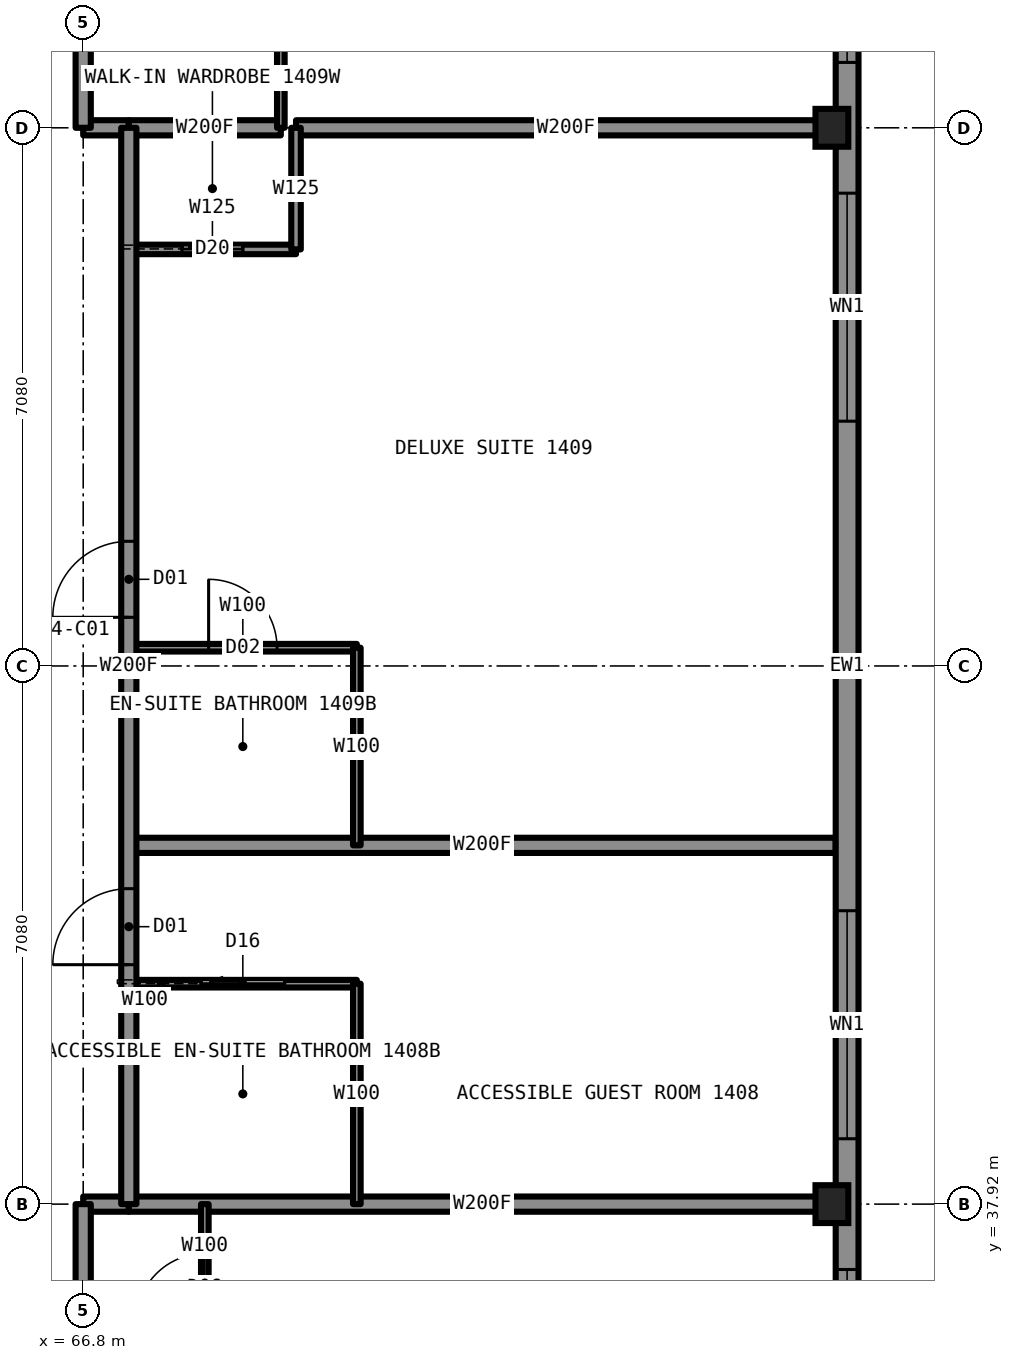
"""IFC4 building model, lengths in metres.
Left out: names, types, materials, properties, quantities, classifications, styles, units other than length and angle.
Written with IfcOpenShell. Run it as: python <this file> out.ifc"""

import sys

from ifc_helpers import new_model, si_unit, direction, frame, frame_2d, origin, origin_2d, place, context, subcontext, project, spatial, rectangle, i_section, extrude, element, fill, save


model = new_model("IFC4")
c1 = context("Model", 3, precision=1e-05, world=origin(), true_north=direction((0.0, 1.0)))
c2 = subcontext(c1, "Body", "Model", "MODEL_VIEW")
j1 = project(units=[si_unit("LENGTHUNIT", "METRE"), si_unit("PLANEANGLEUNIT", "RADIAN")], contexts=[c1])
p1 = place(None, origin())
s1 = spatial("IfcSite", under=j1, at=p1, CompositionType="ELEMENT")
p2 = place(p1, origin())
s2 = spatial("IfcBuilding", under=s1, at=p2, CompositionType="ELEMENT")
p3 = place(p2, frame((0.0, 0.0, 49.5)))
s3 = spatial("IfcBuildingStorey", under=s2, at=p3, CompositionType="ELEMENT", Elevation=49.5)
for number, where, z_axis, x_axis in (
    (1, (76.65, 37.92, 0.0), (0.0, 0.0, 1.0), (1.0, 0.0, 0.0)),
    (2, (76.65, 52.08, 0.0), (0.0, 0.0, 1.0), (1.0, 0.0, 0.0)),
):
    element("IfcColumn", number, at=place(p3, frame(where, z_axis=z_axis, x_axis=x_axis)), inside=s3, PredefinedType="COLUMN", context=c2, shape_type="SweptSolid", body=[
        extrude(i_section(OverallWidth=0.432, OverallDepth=0.498, WebThickness=0.056, FlangeThickness=0.089, at=origin_2d()), origin(), (0.0, 0.0, 1.0), 3.5),
    ])
p4 = place(p3, frame((67.4, 42.64, 0.0), z_axis=(0.0, 0.0, 1.0), x_axis=(1.0, 0.0, 0.0)))
e3 = element("IfcWall", 3, at=p4, inside=s3, PredefinedType="PARTITIONING", context=c2, shape_type="SweptSolid", body=[
    extrude(rectangle(XDim=9.3, YDim=0.2, at=frame_2d((4.65, 0.0))), origin(), (0.0, 0.0, 1.0), 2.723),
])
p5 = place(p3, frame((67.4, 40.82, 0.0), z_axis=(0.0, 0.0, 1.0), x_axis=(1.0, 0.0, 0.0)))
e4 = element("IfcWall", 4, at=p5, inside=s3, PredefinedType="PARTITIONING", context=c2, shape_type="SweptSolid", body=[
    extrude(rectangle(XDim=3.0, YDim=0.1, at=frame_2d((1.5, 0.0))), origin(), (0.0, 0.0, 1.0), 3.33),
])
p6 = place(p5, frame((0.95, 0.0, 0.0)))
e5 = element("IfcOpeningElement", 5, at=p6, cuts=e4, PredefinedType="OPENING", context=c2, shape_type="SweptSolid", body=[
    extrude(rectangle(XDim=1.1, YDim=2.1, at=frame_2d((0.55, 1.05))), frame((0.0, 0.06, 0.0), z_axis=(0.0, -1.0, 0.0), x_axis=(1.0, 0.0, 0.0)), (0.0, 0.0, 1.0), 0.12),
])
p7 = place(p3, frame((66.8, 37.92, 0.0), z_axis=(0.0, 0.0, 1.0), x_axis=(1.0, 0.0, 0.0)))
e6 = element("IfcWall", 6, at=p7, inside=s3, PredefinedType="PARTITIONING", context=c2, shape_type="SweptSolid", body=[
    extrude(rectangle(XDim=0.6, YDim=0.2, at=frame_2d((0.3, 0.0))), origin(), (0.0, 0.0, 1.0), 2.573),
])
p8 = place(p3, frame((67.4, 37.92, 0.0), z_axis=(0.0, 0.0, 1.0), x_axis=(1.0, 0.0, 0.0)))
e7 = element("IfcWall", 7, at=p8, inside=s3, PredefinedType="PARTITIONING", context=c2, shape_type="SweptSolid", body=[
    extrude(rectangle(XDim=9.3, YDim=0.2, at=frame_2d((4.65, 0.0))), origin(), (0.0, 0.0, 1.0), 2.573),
])
p9 = place(p3, frame((67.4, 45.24, 0.0), z_axis=(0.0, 0.0, 1.0), x_axis=(1.0, 0.0, 0.0)))
e8 = element("IfcWall", 8, at=p9, inside=s3, PredefinedType="PARTITIONING", context=c2, shape_type="SweptSolid", body=[
    extrude(rectangle(XDim=3.0, YDim=0.1, at=frame_2d((1.5, 0.0))), origin(), (0.0, 0.0, 1.0), 3.33),
])
p10 = place(p9, frame((1.05, 0.0, 0.0)))
e9 = element("IfcOpeningElement", 9, at=p10, cuts=e8, PredefinedType="OPENING", context=c2, shape_type="SweptSolid", body=[
    extrude(rectangle(XDim=0.9, YDim=2.1, at=frame_2d((0.45, 1.05))), frame((0.0, 0.06, 0.0), z_axis=(0.0, -1.0, 0.0), x_axis=(1.0, 0.0, 0.0)), (0.0, 0.0, 1.0), 0.12),
])
p11 = place(p3, frame((67.4, 50.48, 0.0), z_axis=(0.0, 0.0, 1.0), x_axis=(1.0, 0.0, 0.0)))
e10 = element("IfcWall", 10, at=p11, inside=s3, PredefinedType="PARTITIONING", context=c2, shape_type="SweptSolid", body=[
    extrude(rectangle(XDim=2.2, YDim=0.125, at=frame_2d((1.1, 0.0))), origin(), (0.0, 0.0, 1.0), 3.33),
])
p12 = place(p11, frame((0.7, 0.0, 0.0)))
e11 = element("IfcOpeningElement", 11, at=p12, cuts=e10, PredefinedType="OPENING", context=c2, shape_type="SweptSolid", body=[
    extrude(rectangle(XDim=0.8, YDim=2.1, at=frame_2d((0.4, 1.05))), frame((0.0, 0.073, 0.0), z_axis=(0.0, -1.0, 0.0), x_axis=(1.0, 0.0, 0.0)), (0.0, 0.0, 1.0), 0.145),
])
p13 = place(p3, frame((66.8, 52.08, 0.0), z_axis=(0.0, 0.0, 1.0), x_axis=(1.0, 0.0, 0.0)))
e12 = element("IfcWall", 12, at=p13, inside=s3, PredefinedType="PARTITIONING", context=c2, shape_type="SweptSolid", body=[
    extrude(rectangle(XDim=0.6, YDim=0.2, at=frame_2d((0.3, 0.0))), origin(), (0.0, 0.0, 1.0), 2.573),
])
p14 = place(p3, frame((67.4, 52.08, 0.0), z_axis=(0.0, 0.0, 1.0), x_axis=(1.0, 0.0, 0.0)))
e13 = element("IfcWall", 13, at=p14, inside=s3, PredefinedType="PARTITIONING", context=c2, shape_type="SweptSolid", body=[
    extrude(rectangle(XDim=2.0, YDim=0.2, at=frame_2d((1.0, 0.0))), origin(), (0.0, 0.0, 1.0), 2.573),
])
p15 = place(p3, frame((69.6, 52.08, 0.0), z_axis=(0.0, 0.0, 1.0), x_axis=(1.0, 0.0, 0.0)))
e14 = element("IfcWall", 14, at=p15, inside=s3, PredefinedType="PARTITIONING", context=c2, shape_type="SweptSolid", body=[
    extrude(rectangle(XDim=7.1, YDim=0.2, at=frame_2d((3.55, 0.0))), origin(), (0.0, 0.0, 1.0), 2.573),
])
p16 = place(p3, frame((66.8, 33.2, 0.0), z_axis=(0.0, 0.0, 1.0), x_axis=(0.0, 1.0, 0.0)))
e15 = element("IfcWall", 15, at=p16, inside=s3, PredefinedType="PARTITIONING", context=c2, shape_type="SweptSolid", body=[
    extrude(rectangle(XDim=4.72, YDim=0.2, at=frame_2d((2.36, 0.0))), origin(), (0.0, 0.0, 1.0), 3.33),
])
p17 = place(p16, frame((0.65, 0.0, 0.0)))
e16 = element("IfcOpeningElement", 16, at=p17, cuts=e15, PredefinedType="OPENING", context=c2, shape_type="SweptSolid", body=[
    extrude(rectangle(XDim=1.1, YDim=2.2, at=frame_2d((0.55, 1.1))), frame((0.0, 0.11, 0.0), z_axis=(0.0, -1.0, 0.0), x_axis=(1.0, 0.0, 0.0)), (0.0, 0.0, 1.0), 0.22),
])
p18 = place(p3, frame((66.8, 52.08, 0.0), z_axis=(0.0, 0.0, 1.0), x_axis=(0.0, 1.0, 0.0)))
e17 = element("IfcWall", 17, at=p18, inside=s3, PredefinedType="PARTITIONING", context=c2, shape_type="SweptSolid", body=[
    extrude(rectangle(XDim=4.72, YDim=0.2, at=frame_2d((2.36, 0.0))), origin(), (0.0, 0.0, 1.0), 3.33),
])
p19 = place(p18, frame((2.96, 0.0, 0.0)))
e18 = element("IfcOpeningElement", 18, at=p19, cuts=e17, PredefinedType="OPENING", context=c2, shape_type="SweptSolid", body=[
    extrude(rectangle(XDim=1.1, YDim=2.2, at=frame_2d((0.55, 1.1))), frame((0.0, 0.11, 0.0), z_axis=(0.0, -1.0, 0.0), x_axis=(1.0, 0.0, 0.0)), (0.0, 0.0, 1.0), 0.22),
])
p20 = place(p3, frame((67.4, 37.92, 0.0), z_axis=(0.0, 0.0, 1.0), x_axis=(0.0, 1.0, 0.0)))
e19 = element("IfcWall", 19, at=p20, inside=s3, PredefinedType="PARTITIONING", context=c2, shape_type="SweptSolid", body=[
    extrude(rectangle(XDim=14.16, YDim=0.2, at=frame_2d((7.08, 0.0))), origin(), (0.0, 0.0, 1.0), 3.33),
])
p21 = place(p20, frame((3.15, 0.0, 0.0)))
e20 = element("IfcOpeningElement", 20, at=p21, cuts=e19, PredefinedType="OPENING", context=c2, shape_type="SweptSolid", body=[
    extrude(rectangle(XDim=1.0, YDim=2.2, at=frame_2d((0.5, 1.1))), frame((0.0, 0.11, 0.0), z_axis=(0.0, -1.0, 0.0), x_axis=(1.0, 0.0, 0.0)), (0.0, 0.0, 1.0), 0.22),
])
p22 = place(p20, frame((7.72, 0.0, 0.0)))
e21 = element("IfcOpeningElement", 21, at=p22, cuts=e19, PredefinedType="OPENING", context=c2, shape_type="SweptSolid", body=[
    extrude(rectangle(XDim=1.0, YDim=2.2, at=frame_2d((0.5, 1.1))), frame((0.0, 0.11, 0.0), z_axis=(0.0, -1.0, 0.0), x_axis=(1.0, 0.0, 0.0)), (0.0, 0.0, 1.0), 0.22),
])
p23 = place(p3, frame((68.4, 35.72, 0.0), z_axis=(0.0, 0.0, 1.0), x_axis=(0.0, 1.0, 0.0)))
e22 = element("IfcWall", 22, at=p23, inside=s3, PredefinedType="PARTITIONING", context=c2, shape_type="SweptSolid", body=[
    extrude(rectangle(XDim=2.2, YDim=0.1, at=frame_2d((1.1, 0.0))), origin(), (0.0, 0.0, 1.0), 3.33),
])
p24 = place(p23, frame((0.65, 0.0, 0.0)))
e23 = element("IfcOpeningElement", 23, at=p24, cuts=e22, PredefinedType="OPENING", context=c2, shape_type="SweptSolid", body=[
    extrude(rectangle(XDim=0.9, YDim=2.1, at=frame_2d((0.45, 1.05))), frame((0.0, 0.06, 0.0), z_axis=(0.0, -1.0, 0.0), x_axis=(1.0, 0.0, 0.0)), (0.0, 0.0, 1.0), 0.12),
])
p25 = place(p3, frame((69.4, 52.08, 0.0), z_axis=(0.0, 0.0, 1.0), x_axis=(0.0, 1.0, 0.0)))
e24 = element("IfcWall", 24, at=p25, inside=s3, PredefinedType="PARTITIONING", context=c2, shape_type="SweptSolid", body=[
    extrude(rectangle(XDim=2.6, YDim=0.1, at=frame_2d((1.3, 0.0))), origin(), (0.0, 0.0, 1.0), 3.33),
])
p26 = place(p3, frame((69.6, 50.48, 0.0), z_axis=(0.0, 0.0, 1.0), x_axis=(0.0, 1.0, 0.0)))
e25 = element("IfcWall", 25, at=p26, inside=s3, PredefinedType="PARTITIONING", context=c2, shape_type="SweptSolid", body=[
    extrude(rectangle(XDim=1.6, YDim=0.125, at=frame_2d((0.8, 0.0))), origin(), (0.0, 0.0, 1.0), 3.33),
])
p27 = place(p3, frame((70.4, 37.92, 0.0), z_axis=(0.0, 0.0, 1.0), x_axis=(0.0, 1.0, 0.0)))
e26 = element("IfcWall", 26, at=p27, inside=s3, PredefinedType="PARTITIONING", context=c2, shape_type="SweptSolid", body=[
    extrude(rectangle(XDim=2.9, YDim=0.1, at=frame_2d((1.45, 0.0))), origin(), (0.0, 0.0, 1.0), 3.33),
])
p28 = place(p3, frame((70.4, 42.64, 0.0), z_axis=(0.0, 0.0, 1.0), x_axis=(0.0, 1.0, 0.0)))
e27 = element("IfcWall", 27, at=p28, inside=s3, PredefinedType="PARTITIONING", context=c2, shape_type="SweptSolid", body=[
    extrude(rectangle(XDim=2.6, YDim=0.1, at=frame_2d((1.3, 0.0))), origin(), (0.0, 0.0, 1.0), 3.33),
])
p29 = place(p3, frame((76.85, 28.5, 0.0), z_axis=(0.0, 0.0, 1.0), x_axis=(0.0, 1.0, 0.0)))
e28 = element("IfcWall", 28, at=p29, inside=s3, PredefinedType="SOLIDWALL", context=c2, shape_type="SweptSolid", body=[
    extrude(rectangle(XDim=33.0, YDim=0.3, at=frame_2d((16.5, 0.0))), origin(), (0.0, 0.0, 1.0), 2.83),
])
p30 = place(p29, frame((0.85, 0.0, 0.5)))
e29 = element("IfcOpeningElement", 29, at=p30, cuts=e28, PredefinedType="OPENING", context=c2, shape_type="SweptSolid", body=[
    extrude(rectangle(XDim=3.0, YDim=2.0, at=frame_2d((1.5, 1.0))), frame((0.0, 0.16, 0.0), z_axis=(0.0, -1.0, 0.0), x_axis=(1.0, 0.0, 0.0)), (0.0, 0.0, 1.0), 0.32),
])
p31 = place(p29, frame((5.56, 0.0, 0.5)))
e30 = element("IfcOpeningElement", 30, at=p31, cuts=e28, PredefinedType="OPENING", context=c2, shape_type="SweptSolid", body=[
    extrude(rectangle(XDim=3.0, YDim=2.0, at=frame_2d((1.5, 1.0))), frame((0.0, 0.16, 0.0), z_axis=(0.0, -1.0, 0.0), x_axis=(1.0, 0.0, 0.0)), (0.0, 0.0, 1.0), 0.32),
])
p32 = place(p29, frame((10.28, 0.0, 1.1)))
e31 = element("IfcOpeningElement", 31, at=p32, cuts=e28, PredefinedType="OPENING", context=c2, shape_type="SweptSolid", body=[
    extrude(rectangle(XDim=1.1, YDim=1.4, at=frame_2d((0.55, 0.7))), frame((0.0, 0.16, 0.0), z_axis=(0.0, -1.0, 0.0), x_axis=(1.0, 0.0, 0.0)), (0.0, 0.0, 1.0), 0.32),
])
p33 = place(p29, frame((15.0, 0.0, 0.5)))
e32 = element("IfcOpeningElement", 32, at=p33, cuts=e28, PredefinedType="OPENING", context=c2, shape_type="SweptSolid", body=[
    extrude(rectangle(XDim=3.0, YDim=2.0, at=frame_2d((1.5, 1.0))), frame((0.0, 0.16, 0.0), z_axis=(0.0, -1.0, 0.0), x_axis=(1.0, 0.0, 0.0)), (0.0, 0.0, 1.0), 0.32),
])
p34 = place(p29, frame((21.62, 0.0, 1.1)))
e33 = element("IfcOpeningElement", 33, at=p34, cuts=e28, PredefinedType="OPENING", context=c2, shape_type="SweptSolid", body=[
    extrude(rectangle(XDim=1.1, YDim=1.4, at=frame_2d((0.55, 0.7))), frame((0.0, 0.16, 0.0), z_axis=(0.0, -1.0, 0.0), x_axis=(1.0, 0.0, 0.0)), (0.0, 0.0, 1.0), 0.32),
])
p35 = place(p29, frame((24.44, 0.0, 0.5)))
e34 = element("IfcOpeningElement", 34, at=p35, cuts=e28, PredefinedType="OPENING", context=c2, shape_type="SweptSolid", body=[
    extrude(rectangle(XDim=3.0, YDim=2.0, at=frame_2d((1.5, 1.0))), frame((0.0, 0.16, 0.0), z_axis=(0.0, -1.0, 0.0), x_axis=(1.0, 0.0, 0.0)), (0.0, 0.0, 1.0), 0.32),
])
p36 = place(p29, frame((29.15, 0.0, 0.5)))
e35 = element("IfcOpeningElement", 35, at=p36, cuts=e28, PredefinedType="OPENING", context=c2, shape_type="SweptSolid", body=[
    extrude(rectangle(XDim=3.0, YDim=2.0, at=frame_2d((1.5, 1.0))), frame((0.0, 0.16, 0.0), z_axis=(0.0, -1.0, 0.0), x_axis=(1.0, 0.0, 0.0)), (0.0, 0.0, 1.0), 0.32),
])
p37 = place(p21, origin())
e36 = element("IfcDoor", 36, at=p37, inside=s3, OperationType="SINGLE_SWING_LEFT", PredefinedType="DOOR", context=c2, shape_type="SweptSolid", body=[
    extrude(rectangle(XDim=1.0, YDim=2.2, at=frame_2d((0.5, 1.1))), frame((0.0, 0.025, 0.0), z_axis=(0.0, -1.0, 0.0), x_axis=(1.0, 0.0, 0.0)), (0.0, 0.0, 1.0), 0.05),
])
fill(e20, e36)
p38 = place(p6, origin())
e37 = element("IfcDoor", 37, at=p38, inside=s3, OperationType="SLIDING_TO_LEFT", PredefinedType="DOOR", context=c2, shape_type="SweptSolid", body=[
    extrude(rectangle(XDim=1.1, YDim=2.1, at=frame_2d((0.55, 1.05))), frame((0.0, 0.025, 0.0), z_axis=(0.0, -1.0, 0.0), x_axis=(1.0, 0.0, 0.0)), (0.0, 0.0, 1.0), 0.05),
])
fill(e5, e37)
p39 = place(p22, origin())
e38 = element("IfcDoor", 38, at=p39, inside=s3, OperationType="SINGLE_SWING_LEFT", PredefinedType="DOOR", context=c2, shape_type="SweptSolid", body=[
    extrude(rectangle(XDim=1.0, YDim=2.2, at=frame_2d((0.5, 1.1))), frame((0.0, 0.025, 0.0), z_axis=(0.0, -1.0, 0.0), x_axis=(1.0, 0.0, 0.0)), (0.0, 0.0, 1.0), 0.05),
])
fill(e21, e38)
p40 = place(p10, origin())
e39 = element("IfcDoor", 39, at=p40, inside=s3, OperationType="SINGLE_SWING_RIGHT", PredefinedType="DOOR", context=c2, shape_type="SweptSolid", body=[
    extrude(rectangle(XDim=0.9, YDim=2.1, at=frame_2d((0.45, 1.05))), frame((0.0, 0.025, 0.0), z_axis=(0.0, -1.0, 0.0), x_axis=(1.0, 0.0, 0.0)), (0.0, 0.0, 1.0), 0.05),
])
fill(e9, e39)
p41 = place(p12, origin())
e40 = element("IfcDoor", 40, at=p41, inside=s3, OperationType="SLIDING_TO_LEFT", PredefinedType="DOOR", context=c2, shape_type="SweptSolid", body=[
    extrude(rectangle(XDim=0.8, YDim=2.1, at=frame_2d((0.4, 1.05))), frame((0.0, 0.025, 0.0), z_axis=(0.0, -1.0, 0.0), x_axis=(1.0, 0.0, 0.0)), (0.0, 0.0, 1.0), 0.05),
])
fill(e11, e40)
p42 = place(p24, origin())
e41 = element("IfcDoor", 41, at=p42, inside=s3, OperationType="SINGLE_SWING_LEFT", PredefinedType="DOOR", context=c2, shape_type="SweptSolid", body=[
    extrude(rectangle(XDim=0.9, YDim=2.1, at=frame_2d((0.45, 1.05))), frame((0.0, 0.025, 0.0), z_axis=(0.0, -1.0, 0.0), x_axis=(1.0, 0.0, 0.0)), (0.0, 0.0, 1.0), 0.05),
])
fill(e23, e41)
p43 = place(p31, origin())
e42 = element("IfcWindow", 42, at=p43, inside=s3, PartitioningType="SINGLE_PANEL", PredefinedType="WINDOW", context=c2, shape_type="SweptSolid", body=[
    extrude(rectangle(XDim=3.0, YDim=2.0, at=frame_2d((1.5, 1.0))), frame((0.0, 0.03, 0.0), z_axis=(0.0, -1.0, 0.0), x_axis=(1.0, 0.0, 0.0)), (0.0, 0.0, 1.0), 0.06),
])
fill(e30, e42)
p44 = place(p32, origin())
e43 = element("IfcWindow", 43, at=p44, inside=s3, PartitioningType="SINGLE_PANEL", PredefinedType="WINDOW", context=c2, shape_type="SweptSolid", body=[
    extrude(rectangle(XDim=1.1, YDim=1.4, at=frame_2d((0.55, 0.7))), frame((0.0, 0.03, 0.0), z_axis=(0.0, -1.0, 0.0), x_axis=(1.0, 0.0, 0.0)), (0.0, 0.0, 1.0), 0.06),
])
fill(e31, e43)
p45 = place(p33, origin())
e44 = element("IfcWindow", 44, at=p45, inside=s3, PartitioningType="SINGLE_PANEL", PredefinedType="WINDOW", context=c2, shape_type="SweptSolid", body=[
    extrude(rectangle(XDim=3.0, YDim=2.0, at=frame_2d((1.5, 1.0))), frame((0.0, 0.03, 0.0), z_axis=(0.0, -1.0, 0.0), x_axis=(1.0, 0.0, 0.0)), (0.0, 0.0, 1.0), 0.06),
])
fill(e32, e44)
p46 = place(p34, origin())
e45 = element("IfcWindow", 45, at=p46, inside=s3, PartitioningType="SINGLE_PANEL", PredefinedType="WINDOW", context=c2, shape_type="SweptSolid", body=[
    extrude(rectangle(XDim=1.1, YDim=1.4, at=frame_2d((0.55, 0.7))), frame((0.0, 0.03, 0.0), z_axis=(0.0, -1.0, 0.0), x_axis=(1.0, 0.0, 0.0)), (0.0, 0.0, 1.0), 0.06),
])
fill(e33, e45)
p47 = place(p35, origin())
e46 = element("IfcWindow", 46, at=p47, inside=s3, PartitioningType="SINGLE_PANEL", PredefinedType="WINDOW", context=c2, shape_type="SweptSolid", body=[
    extrude(rectangle(XDim=3.0, YDim=2.0, at=frame_2d((1.5, 1.0))), frame((0.0, 0.03, 0.0), z_axis=(0.0, -1.0, 0.0), x_axis=(1.0, 0.0, 0.0)), (0.0, 0.0, 1.0), 0.06),
])
fill(e34, e46)
save(model, sys.argv[1])
